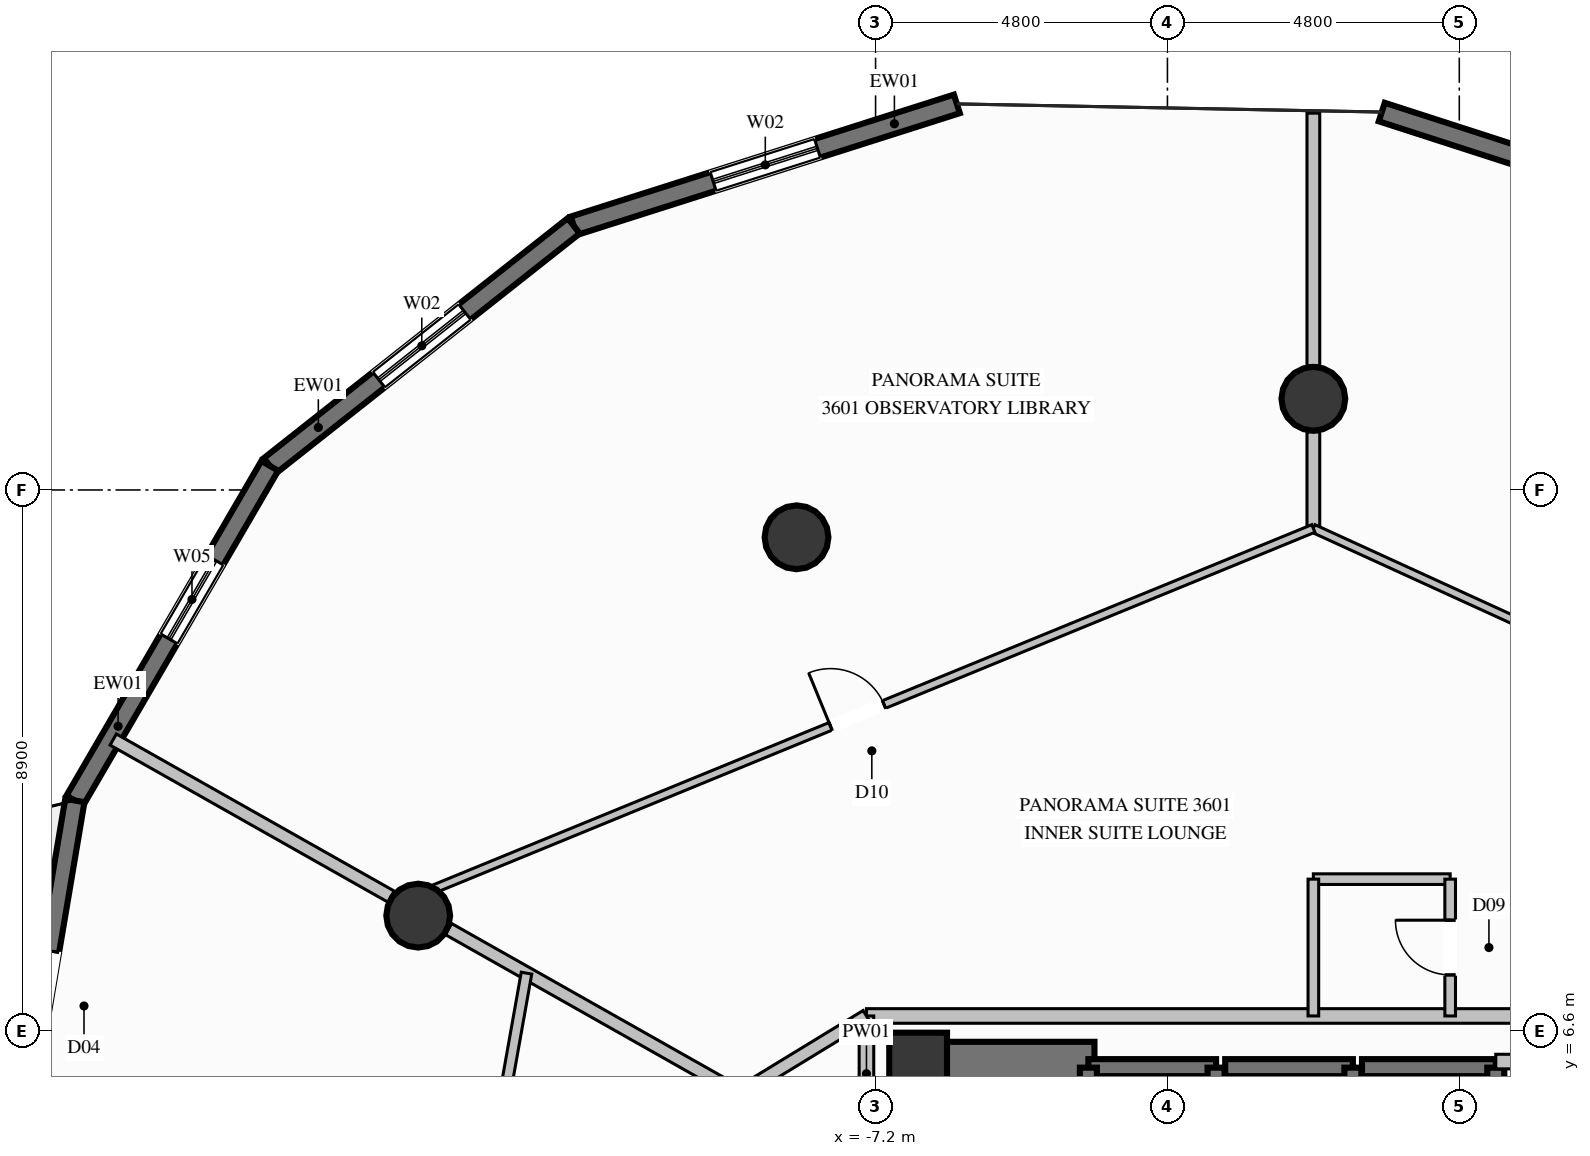
"""IFC4 building model, lengths in metres.
Left out: names, types, materials, properties, quantities, classifications, styles, units other than length and angle.
Written with IfcOpenShell. Run it as: python <this file> out.ifc"""

import sys

from ifc_helpers import new_model, si_unit, direction, frame, frame_2d, origin, origin_2d, place, context, subcontext, project, spatial, rectangle, circle, extrude, element, fill, save


model = new_model("IFC4")
c1 = context("Model", 3, precision=1e-05, world=origin(), true_north=direction((0.0, 1.0)))
c2 = subcontext(c1, "Body", "Model", "MODEL_VIEW")
j1 = project(units=[si_unit("LENGTHUNIT", "METRE"), si_unit("PLANEANGLEUNIT", "RADIAN")], contexts=[c1])
p1 = place(None, origin())
s1 = spatial("IfcSite", under=j1, at=p1, CompositionType="ELEMENT")
p2 = place(p1, origin())
s2 = spatial("IfcBuilding", under=s1, at=p2, CompositionType="ELEMENT")
p3 = place(p2, frame((0.0, 0.0, 135.0)))
s3 = spatial("IfcBuildingStorey", under=s2, at=p3, CompositionType="ELEMENT", Elevation=135.0)
p4 = place(p3, frame((-6.5, 6.1, 0.0), z_axis=(0.0, 0.0, 1.0), x_axis=(1.0, 0.0, 0.0)))
e1 = element("IfcColumn", 1, at=p4, inside=s3, PredefinedType="COLUMN", context=c2, shape_type="SweptSolid", body=[
    extrude(rectangle(XDim=0.95, YDim=0.95, at=origin_2d()), origin(), (0.0, 0.0, 1.0), 3.6),
])
p5 = place(p3, frame((-6.175, 6.1, 0.0), z_axis=(0.0, 0.0, 1.0), x_axis=(1.0, 0.0, 0.0)))
e2 = element("IfcWall", 2, at=p5, inside=s3, PredefinedType="SHEAR", context=c2, shape_type="SweptSolid", body=[
    extrude(rectangle(XDim=2.575, YDim=0.65, at=frame_2d((1.288, 0.0))), origin(), (0.0, 0.0, 1.0), 3.6),
])
p6 = place(p3, frame((-6.5, 2.35, 0.0), z_axis=(0.0, 0.0, 1.0), x_axis=(0.0, 1.0, 0.0)))
e3 = element("IfcWall", 3, at=p6, inside=s3, PredefinedType="SHEAR", context=c2, shape_type="SweptSolid", body=[
    extrude(rectangle(XDim=4.075, YDim=0.65, at=frame_2d((2.038, 0.0))), origin(), (0.0, 0.0, 1.0), 3.6),
])
for number, where, z_axis, x_axis in (
    (4, (0.0, 17.0, 0.0), (0.0, 0.0, 1.0), (1.0, 0.0, 0.0)),
    (5, (-8.5, 14.722, 0.0), (0.0, 0.0, 1.0), (1.0, 0.0, 0.0)),
    (6, (-14.722, 8.5, 0.0), (0.0, 0.0, 1.0), (1.0, 0.0, 0.0)),
):
    element("IfcColumn", number, at=place(p3, frame(where, z_axis=z_axis, x_axis=x_axis)), inside=s3, PredefinedType="COLUMN", context=c2, shape_type="SweptSolid", body=[
        extrude(circle(Radius=0.525, at=origin_2d()), origin(), (0.0, 0.0, 1.0), 3.6),
    ])
p7 = place(p3, frame((1.125, 21.715, 0.0), z_axis=(0.0, 0.0, 1.0), x_axis=(0.951554090089, -0.307481403722, 0.0)))
e7 = element("IfcWall", 7, at=p7, inside=s3, PredefinedType="SOLIDWALL", context=c2, shape_type="SweptSolid", body=[
    extrude(rectangle(XDim=7.347, YDim=0.32, at=frame_2d((3.673, 0.0))), origin(), (0.0, 0.0, 1.0), 3.35),
])
p8 = place(p7, frame((2.773, 0.0, 0.35)))
e8 = element("IfcOpeningElement", 8, at=p8, cuts=e7, PredefinedType="OPENING", context=c2, shape_type="SweptSolid", body=[
    extrude(rectangle(XDim=1.8, YDim=2.6, at=frame_2d((0.9, 1.3))), frame((0.0, 0.17, 0.0), z_axis=(0.0, -1.0, 0.0), x_axis=(1.0, 0.0, 0.0)), (0.0, 0.0, 1.0), 0.34),
])
p9 = place(p3, frame((-12.164, 19.844, 0.0), z_axis=(0.0, 0.0, 1.0), x_axis=(0.952914626631, 0.303238708533, 0.0)))
e9 = element("IfcWall", 9, at=p9, inside=s3, PredefinedType="SOLIDWALL", context=c2, shape_type="SweptSolid", body=[
    extrude(rectangle(XDim=6.612, YDim=0.32, at=frame_2d((3.306, 0.0))), origin(), (0.0, 0.0, 1.0), 3.35),
])
p10 = place(p9, frame((2.406, 0.0, 0.35)))
e10 = element("IfcOpeningElement", 10, at=p10, cuts=e9, PredefinedType="OPENING", context=c2, shape_type="SweptSolid", body=[
    extrude(rectangle(XDim=1.8, YDim=2.6, at=frame_2d((0.9, 1.3))), frame((0.0, 0.17, 0.0), z_axis=(0.0, -1.0, 0.0), x_axis=(1.0, 0.0, 0.0)), (0.0, 0.0, 1.0), 0.34),
])
p11 = place(p3, frame((-17.163, 15.897, 0.0), z_axis=(0.0, 0.0, 1.0), x_axis=(0.784850386513, 0.619685299802, 0.0)))
e11 = element("IfcWall", 11, at=p11, inside=s3, PredefinedType="SOLIDWALL", context=c2, shape_type="SweptSolid", body=[
    extrude(rectangle(XDim=6.369, YDim=0.32, at=frame_2d((3.185, 0.0))), origin(), (0.0, 0.0, 1.0), 3.35),
])
p12 = place(p11, frame((2.285, 0.0, 0.35)))
e12 = element("IfcOpeningElement", 12, at=p12, cuts=e11, PredefinedType="OPENING", context=c2, shape_type="SweptSolid", body=[
    extrude(rectangle(XDim=1.8, YDim=2.6, at=frame_2d((0.9, 1.3))), frame((0.0, 0.17, 0.0), z_axis=(0.0, -1.0, 0.0), x_axis=(1.0, 0.0, 0.0)), (0.0, 0.0, 1.0), 0.34),
])
p13 = place(p3, frame((-20.369, 10.393, 0.0), z_axis=(0.0, 0.0, 1.0), x_axis=(0.503308483644, 0.86410680491, 0.0)))
e13 = element("IfcWall", 13, at=p13, inside=s3, PredefinedType="SOLIDWALL", context=c2, shape_type="SweptSolid", body=[
    extrude(rectangle(XDim=6.369, YDim=0.32, at=frame_2d((3.185, 0.0))), origin(), (0.0, 0.0, 1.0), 3.35),
])
p14 = place(p13, frame((3.077, 0.0, 0.85)))
e14 = element("IfcOpeningElement", 14, at=p14, cuts=e13, PredefinedType="OPENING", context=c2, shape_type="SweptSolid", body=[
    extrude(rectangle(XDim=1.5, YDim=1.2, at=frame_2d((0.75, 0.6))), frame((0.0, 0.17, 0.0), z_axis=(0.0, -1.0, 0.0), x_axis=(1.0, 0.0, 0.0)), (0.0, 0.0, 1.0), 0.34),
])
p15 = place(p3, frame((-21.468, 3.872, 0.0), z_axis=(0.0, 0.0, 1.0), x_axis=(0.166206715806, 0.986090932734, 0.0)))
e15 = element("IfcWall", 15, at=p15, inside=s3, PredefinedType="SOLIDWALL", context=c2, shape_type="SweptSolid", body=[
    extrude(rectangle(XDim=6.613, YDim=0.32, at=frame_2d((3.307, 0.0))), origin(), (0.0, 0.0, 1.0), 3.35),
])
p16 = place(p15, frame((2.506, 0.0, 0.0)))
e16 = element("IfcOpeningElement", 16, at=p16, cuts=e15, PredefinedType="OPENING", context=c2, shape_type="SweptSolid", body=[
    extrude(rectangle(XDim=1.6, YDim=2.3, at=frame_2d((0.8, 1.15))), frame((0.0, 0.17, 0.0), z_axis=(0.0, -1.0, 0.0), x_axis=(1.0, 0.0, 0.0)), (0.0, 0.0, 1.0), 0.34),
])
p17 = place(p3, frame((-1.6, 6.0, 0.0), z_axis=(0.0, 0.0, 1.0), x_axis=(-1.0, 0.0, 0.0)))
e17 = element("IfcWall", 17, at=p17, inside=s3, PredefinedType="SOLIDWALL", context=c2, shape_type="SweptSolid", body=[
    extrude(rectangle(XDim=2.1, YDim=0.28, at=frame_2d((1.05, 0.0))), origin(), (0.0, 0.0, 1.0), 3.35),
])
for number, where, z_axis, x_axis in (
    (18, (-3.7, 6.0, 0.0), (0.0, 0.0, 1.0), (0.0, -1.0, 0.0)),
    (19, (-1.6, 3.5, 0.0), (0.0, 0.0, 1.0), (0.0, 1.0, 0.0)),
):
    element("IfcWall", number, at=place(p3, frame(where, z_axis=z_axis, x_axis=x_axis)), inside=s3, PredefinedType="SOLIDWALL", context=c2, shape_type="SweptSolid", body=[
        extrude(rectangle(XDim=2.5, YDim=0.28, at=frame_2d((1.25, 0.0))), origin(), (0.0, 0.0, 1.0), 3.35),
    ])
p18 = place(p3, frame((0.65, 6.0, 0.0), z_axis=(0.0, 0.0, 1.0), x_axis=(-1.0, 0.0, 0.0)))
e20 = element("IfcWall", 20, at=p18, inside=s3, PredefinedType="SOLIDWALL", context=c2, shape_type="SweptSolid", body=[
    extrude(rectangle(XDim=2.1, YDim=0.28, at=frame_2d((1.05, 0.0))), origin(), (0.0, 0.0, 1.0), 3.35),
])
p19 = place(p3, frame((0.65, 3.5, 0.0), z_axis=(0.0, 0.0, 1.0), x_axis=(0.0, 1.0, 0.0)))
e21 = element("IfcWall", 21, at=p19, inside=s3, PredefinedType="SOLIDWALL", context=c2, shape_type="SweptSolid", body=[
    extrude(rectangle(XDim=2.5, YDim=0.28, at=frame_2d((1.25, 0.0))), origin(), (0.0, 0.0, 1.0), 3.35),
])
p20 = place(p3, frame((3.0, 6.0, 0.0), z_axis=(0.0, 0.0, 1.0), x_axis=(-1.0, 0.0, 0.0)))
e22 = element("IfcWall", 22, at=p20, inside=s3, PredefinedType="SOLIDWALL", context=c2, shape_type="SweptSolid", body=[
    extrude(rectangle(XDim=2.2, YDim=0.28, at=frame_2d((1.1, 0.0))), origin(), (0.0, 0.0, 1.0), 3.35),
])
p21 = place(p3, frame((3.0, 3.5, 0.0), z_axis=(0.0, 0.0, 1.0), x_axis=(0.0, 1.0, 0.0)))
e23 = element("IfcWall", 23, at=p21, inside=s3, PredefinedType="SOLIDWALL", context=c2, shape_type="SweptSolid", body=[
    extrude(rectangle(XDim=2.5, YDim=0.28, at=frame_2d((1.25, 0.0))), origin(), (0.0, 0.0, 1.0), 3.35),
])
p22 = place(p3, frame((-7.35, 6.85, 0.0), z_axis=(0.0, 0.0, 1.0), x_axis=(1.0, 0.0, 0.0)))
e24 = element("IfcWall", 24, at=p22, inside=s3, PredefinedType="PARTITIONING", context=c2, shape_type="SweptSolid", body=[
    extrude(rectangle(XDim=14.7, YDim=0.24, at=frame_2d((7.35, 0.0))), origin(), (0.0, 0.0, 1.0), 2.435),
])
p23 = place(p3, frame((-7.35, 4.95, 0.0), z_axis=(0.0, 0.0, 1.0), x_axis=(0.0, 1.0, 0.0)))
e25 = element("IfcWall", 25, at=p23, inside=s3, PredefinedType="PARTITIONING", context=c2, shape_type="SweptSolid", body=[
    extrude(rectangle(XDim=1.9, YDim=0.24, at=frame_2d((0.95, 0.0))), origin(), (0.0, 0.0, 1.0), 2.435),
])
p24 = place(p3, frame((3.0, 6.1, 0.0), z_axis=(0.0, 0.0, 1.0), x_axis=(1.0, 0.0, 0.0)))
e26 = element("IfcWall", 26, at=p24, inside=s3, PredefinedType="PARTITIONING", context=c2, shape_type="SweptSolid", body=[
    extrude(rectangle(XDim=2.85, YDim=0.24, at=frame_2d((1.425, 0.0))), origin(), (0.0, 0.0, 1.0), 2.435),
])
p25 = place(p3, frame((-9.44, 5.575, 0.0), z_axis=(0.0, 0.0, 1.0), x_axis=(-0.87056283872, 0.492057256668, 0.0)))
e27 = element("IfcWall", 27, at=p25, inside=s3, PredefinedType="PARTITIONING", context=c2, shape_type="SweptSolid", body=[
    extrude(rectangle(XDim=5.496, YDim=0.21, at=frame_2d((2.748, 0.0))), origin(), (0.0, 0.0, 1.0), 2.717),
])
p26 = place(p3, frame((-15.168, 8.813, 0.0), z_axis=(0.0, 0.0, 1.0), x_axis=(-0.870568901918, 0.492046529317, 0.0)))
e28 = element("IfcWall", 28, at=p26, inside=s3, PredefinedType="PARTITIONING", context=c2, shape_type="SweptSolid", body=[
    extrude(rectangle(XDim=5.25, YDim=0.21, at=frame_2d((2.625, 0.0))), origin(), (0.0, 0.0, 1.0), 3.35),
])
for number, where, z_axis, x_axis in (
    (29, (0.0, 9.1, 0.0), (0.0, 0.0, 1.0), (1.0, 0.0, 0.0)),
    (30, (0.0, 9.1, 0.0), (0.0, 0.0, 1.0), (0.0, -1.0, 0.0)),
):
    element("IfcWall", number, at=place(p3, frame(where, z_axis=z_axis, x_axis=x_axis)), inside=s3, PredefinedType="PLUMBINGWALL", context=c2, shape_type="SweptSolid", body=[
        extrude(rectangle(XDim=2.25, YDim=0.175, at=frame_2d((1.125, 0.0))), origin(), (0.0, 0.0, 1.0), 3.35),
    ])
p27 = place(p3, frame((2.25, 6.85, 0.0), z_axis=(0.0, 0.0, 1.0), x_axis=(0.0, 1.0, 0.0)))
e31 = element("IfcWall", 31, at=p27, inside=s3, PredefinedType="PLUMBINGWALL", context=c2, shape_type="SweptSolid", body=[
    extrude(rectangle(XDim=2.25, YDim=0.175, at=frame_2d((1.125, 0.0))), origin(), (0.0, 0.0, 1.0), 3.35),
])
p28 = place(p27, frame((0.675, 0.0, 0.0)))
e32 = element("IfcOpeningElement", 32, at=p28, cuts=e31, PredefinedType="OPENING", context=c2, shape_type="SweptSolid", body=[
    extrude(rectangle(XDim=0.9, YDim=2.1, at=frame_2d((0.45, 1.05))), frame((0.0, 0.098, 0.0), z_axis=(0.0, -1.0, 0.0), x_axis=(1.0, 0.0, 0.0)), (0.0, 0.0, 1.0), 0.195),
])
p29 = place(p3, frame((-9.44, 5.575, 0.0), z_axis=(0.0, 0.0, 1.0), x_axis=(0.853641534933, 0.520860950579, 0.0)))
e33 = element("IfcWall", 33, at=p29, inside=s3, PredefinedType="PARTITIONING", context=c2, shape_type="SweptSolid", body=[
    extrude(rectangle(XDim=2.448, YDim=0.21, at=frame_2d((1.224, 0.0))), origin(), (0.0, 0.0, 1.0), 3.35),
])
p30 = place(p3, frame((0.0, 14.867, 0.0), z_axis=(0.0, 0.0, 1.0), x_axis=(0.0, 1.0, 0.0)))
e34 = element("IfcWall", 34, at=p30, inside=s3, PredefinedType="PARTITIONING", context=c2, shape_type="SweptSolid", body=[
    extrude(rectangle(XDim=1.588, YDim=0.21, at=frame_2d((0.794, 0.0))), origin(), (0.0, 0.0, 1.0), 3.35),
])
p31 = place(p3, frame((0.0, 17.545, 0.0), z_axis=(0.0, 0.0, 1.0), x_axis=(0.0, 1.0, 0.0)))
e35 = element("IfcWall", 35, at=p31, inside=s3, PredefinedType="PARTITIONING", context=c2, shape_type="SweptSolid", body=[
    extrude(rectangle(XDim=4.152, YDim=0.21, at=frame_2d((2.076, 0.0))), origin(), (0.0, 0.0, 1.0), 3.35),
])
p32 = place(p3, frame((0.0, 14.867, 0.0), z_axis=(0.0, 0.0, 1.0), x_axis=(0.909485869623, -0.415734834909, 0.0)))
e36 = element("IfcWall", 36, at=p32, inside=s3, PredefinedType="PARTITIONING", context=c2, shape_type="SweptSolid", body=[
    extrude(rectangle(XDim=15.741, YDim=0.135, at=frame_2d((7.87, 0.0))), origin(), (0.0, 0.0, 1.0), 2.878),
])
p33 = place(p32, frame((7.395, 0.0, 0.0)))
e37 = element("IfcOpeningElement", 37, at=p33, cuts=e36, PredefinedType="OPENING", context=c2, shape_type="SweptSolid", body=[
    extrude(rectangle(XDim=0.95, YDim=2.1, at=frame_2d((0.475, 1.05))), frame((0.0, 0.078, 0.0), z_axis=(0.0, -1.0, 0.0), x_axis=(1.0, 0.0, 0.0)), (0.0, 0.0, 1.0), 0.155),
])
p34 = place(p3, frame((-15.001, 8.718, 0.0), z_axis=(0.0, 0.0, 1.0), x_axis=(0.925283827326, 0.379275412978, 0.0)))
e38 = element("IfcWall", 38, at=p34, inside=s3, PredefinedType="PARTITIONING", context=c2, shape_type="SweptSolid", body=[
    extrude(rectangle(XDim=16.212, YDim=0.135, at=frame_2d((8.106, 0.0))), origin(), (0.0, 0.0, 1.0), 2.806),
])
p35 = place(p34, frame((7.631, 0.0, 0.0)))
e39 = element("IfcOpeningElement", 39, at=p35, cuts=e38, PredefinedType="OPENING", context=c2, shape_type="SweptSolid", body=[
    extrude(rectangle(XDim=0.95, YDim=2.1, at=frame_2d((0.475, 1.05))), frame((0.0, 0.078, 0.0), z_axis=(0.0, -1.0, 0.0), x_axis=(1.0, 0.0, 0.0)), (0.0, 0.0, 1.0), 0.155),
])
p36 = place(p3, frame((-12.941, 7.554, 0.0), z_axis=(0.0, 0.0, 1.0), x_axis=(-0.175195404058, -0.984533681698, 0.0)))
e40 = element("IfcWall", 40, at=p36, inside=s3, PredefinedType="PLUMBINGWALL", context=c2, shape_type="SweptSolid", body=[
    extrude(rectangle(XDim=3.18, YDim=0.175, at=frame_2d((1.59, 0.0))), origin(), (0.0, 0.0, 1.0), 3.35),
])
p37 = place(p10, origin())
e41 = element("IfcWindow", 41, at=p37, inside=s3, PartitioningType="SINGLE_PANEL", PredefinedType="WINDOW", context=c2, shape_type="SweptSolid", body=[
    extrude(rectangle(XDim=1.8, YDim=2.6, at=frame_2d((0.9, 1.3))), frame((0.0, 0.03, 0.0), z_axis=(0.0, -1.0, 0.0), x_axis=(1.0, 0.0, 0.0)), (0.0, 0.0, 1.0), 0.06),
])
fill(e10, e41)
p38 = place(p12, origin())
e42 = element("IfcWindow", 42, at=p38, inside=s3, PartitioningType="SINGLE_PANEL", PredefinedType="WINDOW", context=c2, shape_type="SweptSolid", body=[
    extrude(rectangle(XDim=1.8, YDim=2.6, at=frame_2d((0.9, 1.3))), frame((0.0, 0.03, 0.0), z_axis=(0.0, -1.0, 0.0), x_axis=(1.0, 0.0, 0.0)), (0.0, 0.0, 1.0), 0.06),
])
fill(e12, e42)
p39 = place(p14, origin())
e43 = element("IfcWindow", 43, at=p39, inside=s3, PartitioningType="SINGLE_PANEL", PredefinedType="WINDOW", context=c2, shape_type="SweptSolid", body=[
    extrude(rectangle(XDim=1.5, YDim=1.2, at=frame_2d((0.75, 0.6))), frame((0.0, 0.03, 0.0), z_axis=(0.0, -1.0, 0.0), x_axis=(1.0, 0.0, 0.0)), (0.0, 0.0, 1.0), 0.06),
])
fill(e14, e43)
p40 = place(p28, origin())
e44 = element("IfcDoor", 44, at=p40, inside=s3, OperationType="SINGLE_SWING_RIGHT", PredefinedType="DOOR", context=c2, shape_type="SweptSolid", body=[
    extrude(rectangle(XDim=0.9, YDim=2.1, at=frame_2d((0.45, 1.05))), frame((0.0, 0.025, 0.0), z_axis=(0.0, -1.0, 0.0), x_axis=(1.0, 0.0, 0.0)), (0.0, 0.0, 1.0), 0.05),
])
fill(e32, e44)
p41 = place(p35, origin())
e45 = element("IfcDoor", 45, at=p41, inside=s3, OperationType="SINGLE_SWING_LEFT", PredefinedType="DOOR", context=c2, shape_type="SweptSolid", body=[
    extrude(rectangle(XDim=0.95, YDim=2.1, at=frame_2d((0.475, 1.05))), frame((0.0, 0.025, 0.0), z_axis=(0.0, -1.0, 0.0), x_axis=(1.0, 0.0, 0.0)), (0.0, 0.0, 1.0), 0.05),
])
fill(e39, e45)
save(model, sys.argv[1])
